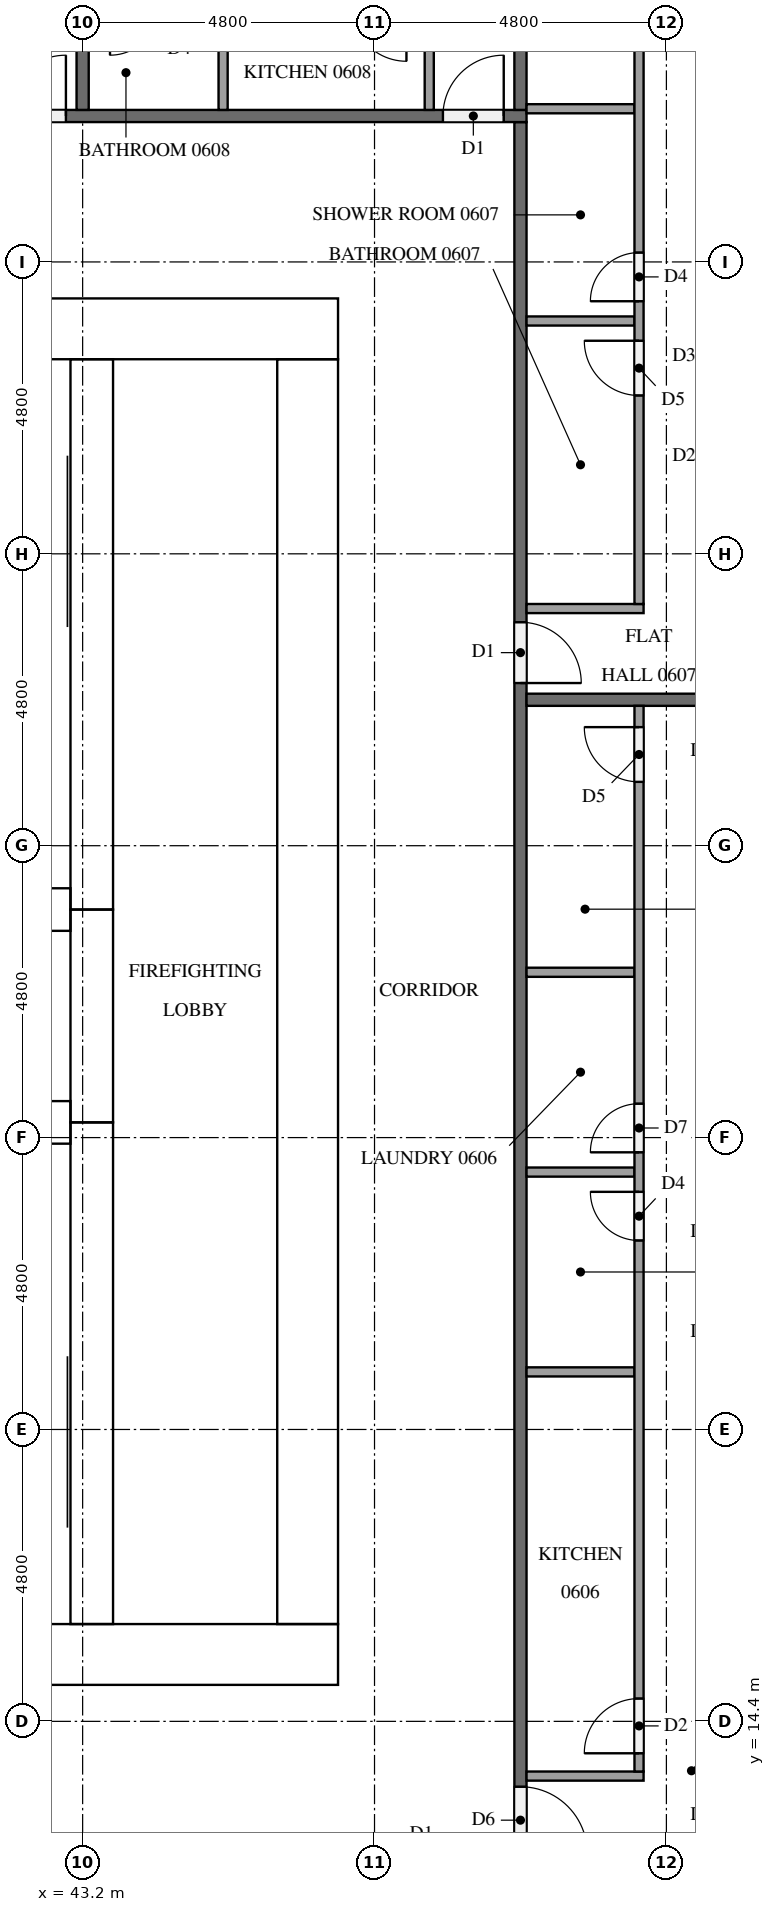
"""IFC4 building model, lengths in metres.
Left out: names, types, materials, properties, quantities, classifications, styles, units other than length and angle.
Written with IfcOpenShell. Run it as: python <this file> out.ifc"""

import sys

from ifc_helpers import new_model, si_unit, direction, frame, frame_2d, origin, place, context, subcontext, project, spatial, rectangle, extrude, element, fill, save


model = new_model("IFC4")
c1 = context("Model", 3, precision=1e-05, world=origin(), true_north=direction((0.0, 1.0)))
c2 = subcontext(c1, "Body", "Model", "MODEL_VIEW")
j1 = project(units=[si_unit("LENGTHUNIT", "METRE"), si_unit("PLANEANGLEUNIT", "RADIAN")], contexts=[c1])
p1 = place(None, origin())
s1 = spatial("IfcSite", under=j1, at=p1, CompositionType="ELEMENT")
p2 = place(p1, origin())
s2 = spatial("IfcBuilding", under=s1, at=p2, CompositionType="ELEMENT")
p3 = place(p2, frame((0.0, 0.0, 29.4)))
s3 = spatial("IfcBuildingStorey", under=s2, at=p3, CompositionType="ELEMENT", Elevation=29.4)
p4 = place(p3, frame((15.0, 15.5, 0.0), z_axis=(0.0, 0.0, 1.0), x_axis=(1.0, 0.0, 0.0)))
e1 = element("IfcWall", 1, at=p4, inside=s3, PredefinedType="SHEAR", context=c2, shape_type="SweptSolid", body=[
    extrude(rectangle(XDim=32.4, YDim=1.0, at=frame_2d((16.2, 0.0))), origin(), (0.0, 0.0, 1.0), 3.2),
])
p5 = place(p4, frame((15.3, 0.0, 0.0)))
e2 = element("IfcOpeningElement", 2, at=p5, cuts=e1, PredefinedType="OPENING", context=c2, shape_type="SweptSolid", body=[
    extrude(rectangle(XDim=1.8, YDim=2.1, at=frame_2d((0.9, 1.05))), frame((0.0, 0.51, 0.0), z_axis=(0.0, -1.0, 0.0), x_axis=(1.0, 0.0, 0.0)), (0.0, 0.0, 1.0), 1.02),
])
p6 = place(p3, frame((15.0, 37.3, 0.0), z_axis=(0.0, 0.0, 1.0), x_axis=(1.0, 0.0, 0.0)))
e3 = element("IfcWall", 3, at=p6, inside=s3, PredefinedType="SHEAR", context=c2, shape_type="SweptSolid", body=[
    extrude(rectangle(XDim=32.4, YDim=1.0, at=frame_2d((16.2, 0.0))), origin(), (0.0, 0.0, 1.0), 3.2),
])
p7 = place(p6, frame((15.3, 0.0, 0.0)))
e4 = element("IfcOpeningElement", 4, at=p7, cuts=e3, PredefinedType="OPENING", context=c2, shape_type="SweptSolid", body=[
    extrude(rectangle(XDim=1.8, YDim=2.1, at=frame_2d((0.9, 1.05))), frame((0.0, 0.51, 0.0), z_axis=(0.0, -1.0, 0.0), x_axis=(1.0, 0.0, 0.0)), (0.0, 0.0, 1.0), 1.02),
])
p8 = place(p6, frame((1.766, 0.0, 0.0)))
e5 = element("IfcOpeningElement", 5, at=p8, cuts=e3, PredefinedType="OPENING", context=c2, shape_type="SweptSolid", body=[
    extrude(rectangle(XDim=1.0, YDim=2.1, at=frame_2d((0.5, 1.05))), frame((0.0, 0.51, 0.0), z_axis=(0.0, -1.0, 0.0), x_axis=(1.0, 0.0, 0.0)), (0.0, 0.0, 1.0), 1.02),
])
p9 = place(p6, frame((5.241, 0.0, 0.0)))
e6 = element("IfcOpeningElement", 6, at=p9, cuts=e3, PredefinedType="OPENING", context=c2, shape_type="SweptSolid", body=[
    extrude(rectangle(XDim=1.0, YDim=2.1, at=frame_2d((0.5, 1.05))), frame((0.0, 0.51, 0.0), z_axis=(0.0, -1.0, 0.0), x_axis=(1.0, 0.0, 0.0)), (0.0, 0.0, 1.0), 1.02),
])
p10 = place(p3, frame((46.9, 16.0, 0.0), z_axis=(0.0, 0.0, 1.0), x_axis=(0.0, 1.0, 0.0)))
e7 = element("IfcWall", 7, at=p10, inside=s3, PredefinedType="SHEAR", context=c2, shape_type="SweptSolid", body=[
    extrude(rectangle(XDim=20.8, YDim=1.0, at=frame_2d((10.4, 0.0))), origin(), (0.0, 0.0, 1.0), 3.2),
])
p11 = place(p10, frame((10.1, 0.0, 0.0)))
e8 = element("IfcOpeningElement", 8, at=p11, cuts=e7, PredefinedType="OPENING", context=c2, shape_type="SweptSolid", body=[
    extrude(rectangle(XDim=1.2, YDim=2.1, at=frame_2d((0.6, 1.05))), frame((0.0, 0.51, 0.0), z_axis=(0.0, -1.0, 0.0), x_axis=(1.0, 0.0, 0.0)), (0.0, 0.0, 1.0), 1.02),
])
p12 = place(p3, frame((43.35, 16.0, 0.0), z_axis=(0.0, 0.0, 1.0), x_axis=(0.0, 1.0, 0.0)))
e9 = element("IfcWall", 9, at=p12, inside=s3, PredefinedType="SHEAR", context=c2, shape_type="SweptSolid", body=[
    extrude(rectangle(XDim=8.25, YDim=0.7, at=frame_2d((4.125, 0.0))), origin(), (0.0, 0.0, 1.0), 3.2),
])
p13 = place(p12, frame((0.2, 0.0, 0.0)))
e10 = element("IfcOpeningElement", 10, at=p13, cuts=e9, PredefinedType="OPENING", context=c2, shape_type="SweptSolid", body=[
    extrude(rectangle(XDim=1.2, YDim=2.1, at=frame_2d((0.6, 1.05))), frame((0.0, 0.36, 0.0), z_axis=(0.0, -1.0, 0.0), x_axis=(1.0, 0.0, 0.0)), (0.0, 0.0, 1.0), 0.72),
])
p14 = place(p3, frame((43.35, 24.25, 0.0), z_axis=(0.0, 0.0, 1.0), x_axis=(0.0, 1.0, 0.0)))
e11 = element("IfcWall", 11, at=p14, inside=s3, PredefinedType="SHEAR", context=c2, shape_type="SweptSolid", body=[
    extrude(rectangle(XDim=3.5, YDim=0.7, at=frame_2d((1.75, 0.0))), origin(), (0.0, 0.0, 1.0), 3.2),
])
p15 = place(p14, frame((1.2, 0.0, 0.0)))
e12 = element("IfcOpeningElement", 12, at=p15, cuts=e11, PredefinedType="OPENING", context=c2, shape_type="SweptSolid", body=[
    extrude(rectangle(XDim=1.1, YDim=2.1, at=frame_2d((0.55, 1.05))), frame((0.0, 0.36, 0.0), z_axis=(0.0, -1.0, 0.0), x_axis=(1.0, 0.0, 0.0)), (0.0, 0.0, 1.0), 0.72),
])
p16 = place(p3, frame((43.35, 27.75, 0.0), z_axis=(0.0, 0.0, 1.0), x_axis=(0.0, 1.0, 0.0)))
e13 = element("IfcWall", 13, at=p16, inside=s3, PredefinedType="SHEAR", context=c2, shape_type="SweptSolid", body=[
    extrude(rectangle(XDim=9.05, YDim=0.7, at=frame_2d((4.525, 0.0))), origin(), (0.0, 0.0, 1.0), 3.2),
])
p17 = place(p16, frame((7.65, 0.0, 0.0)))
e14 = element("IfcOpeningElement", 14, at=p17, cuts=e13, PredefinedType="OPENING", context=c2, shape_type="SweptSolid", body=[
    extrude(rectangle(XDim=1.2, YDim=2.1, at=frame_2d((0.6, 1.05))), frame((0.0, 0.36, 0.0), z_axis=(0.0, -1.0, 0.0), x_axis=(1.0, 0.0, 0.0)), (0.0, 0.0, 1.0), 0.72),
])
for number, where, z_axis, x_axis in (
    (15, (39.65, 24.25, 0.0), (0.0, 0.0, 1.0), (1.0, 0.0, 0.0)),
    (16, (39.65, 27.75, 0.0), (0.0, 0.0, 1.0), (1.0, 0.0, 0.0)),
):
    element("IfcWall", number, at=place(p3, frame(where, z_axis=z_axis, x_axis=x_axis)), inside=s3, PredefinedType="SHEAR", context=c2, shape_type="SweptSolid", body=[
        extrude(rectangle(XDim=3.35, YDim=0.7, at=frame_2d((1.675, 0.0))), origin(), (0.0, 0.0, 1.0), 3.2),
    ])
p18 = place(p3, frame((50.4, 40.7, 0.0), z_axis=(0.0, 0.0, 1.0), x_axis=(0.0, -1.0, 0.0)))
e17 = element("IfcWall", 17, at=p18, inside=s3, PredefinedType="PARTITIONING", context=c2, shape_type="SweptSolid", body=[
    extrude(rectangle(XDim=28.6, YDim=0.2, at=frame_2d((14.3, 0.0))), origin(), (0.0, 0.0, 1.0), 3.2),
])
p19 = place(p18, frame((27.375, 0.0, 0.0)))
e18 = element("IfcOpeningElement", 18, at=p19, cuts=e17, PredefinedType="OPENING", context=c2, shape_type="SweptSolid", body=[
    extrude(rectangle(XDim=1.1, YDim=2.1, at=frame_2d((0.55, 1.05))), frame((0.0, 0.11, 0.0), z_axis=(0.0, -1.0, 0.0), x_axis=(1.0, 0.0, 0.0)), (0.0, 0.0, 1.0), 0.22),
])
p20 = place(p18, frame((8.225, 0.0, 0.0)))
e19 = element("IfcOpeningElement", 19, at=p20, cuts=e17, PredefinedType="OPENING", context=c2, shape_type="SweptSolid", body=[
    extrude(rectangle(XDim=1.0, YDim=2.1, at=frame_2d((0.5, 1.05))), frame((0.0, 0.11, 0.0), z_axis=(0.0, -1.0, 0.0), x_axis=(1.0, 0.0, 0.0)), (0.0, 0.0, 1.0), 0.22),
])
p21 = place(p3, frame((11.9, 40.8, 0.0), z_axis=(0.0, 0.0, 1.0), x_axis=(1.0, 0.0, 0.0)))
e20 = element("IfcWall", 20, at=p21, inside=s3, PredefinedType="PARTITIONING", context=c2, shape_type="SweptSolid", body=[
    extrude(rectangle(XDim=38.6, YDim=0.2, at=frame_2d((19.3, 0.0))), origin(), (0.0, 0.0, 1.0), 3.2),
])
p22 = place(p21, frame((37.225, 0.0, 0.0)))
e21 = element("IfcOpeningElement", 21, at=p22, cuts=e20, PredefinedType="OPENING", context=c2, shape_type="SweptSolid", body=[
    extrude(rectangle(XDim=1.0, YDim=2.1, at=frame_2d((0.5, 1.05))), frame((0.0, 0.11, 0.0), z_axis=(0.0, -1.0, 0.0), x_axis=(1.0, 0.0, 0.0)), (0.0, 0.0, 1.0), 0.22),
])
p23 = place(p21, frame((30.025, 0.0, 0.0)))
e22 = element("IfcOpeningElement", 22, at=p23, cuts=e20, PredefinedType="OPENING", context=c2, shape_type="SweptSolid", body=[
    extrude(rectangle(XDim=1.0, YDim=2.1, at=frame_2d((0.5, 1.05))), frame((0.0, 0.11, 0.0), z_axis=(0.0, -1.0, 0.0), x_axis=(1.0, 0.0, 0.0)), (0.0, 0.0, 1.0), 0.22),
])
p24 = place(p21, frame((2.725, 0.0, 0.0)))
e23 = element("IfcOpeningElement", 23, at=p24, cuts=e20, PredefinedType="OPENING", context=c2, shape_type="SweptSolid", body=[
    extrude(rectangle(XDim=1.1, YDim=2.1, at=frame_2d((0.55, 1.05))), frame((0.0, 0.11, 0.0), z_axis=(0.0, -1.0, 0.0), x_axis=(1.0, 0.0, 0.0)), (0.0, 0.0, 1.0), 0.22),
])
p25 = place(p21, frame((1.225, 0.0, 0.0)))
e24 = element("IfcOpeningElement", 24, at=p25, cuts=e20, PredefinedType="OPENING", context=c2, shape_type="SweptSolid", body=[
    extrude(rectangle(XDim=1.0, YDim=2.1, at=frame_2d((0.5, 1.05))), frame((0.0, 0.11, 0.0), z_axis=(0.0, -1.0, 0.0), x_axis=(1.0, 0.0, 0.0)), (0.0, 0.0, 1.0), 0.22),
])
for number, where, z_axis, x_axis in (
    (25, (50.5, 31.2, 0.0), (0.0, 0.0, 1.0), (1.0, 0.0, 0.0)),
    (26, (50.4, 40.9, 0.0), (0.0, 0.0, 1.0), (0.0, 1.0, 0.0)),
):
    element("IfcWall", number, at=place(p3, frame(where, z_axis=z_axis, x_axis=x_axis)), inside=s3, PredefinedType="PARTITIONING", context=c2, shape_type="SweptSolid", body=[
        extrude(rectangle(XDim=7.0, YDim=0.2, at=frame_2d((3.5, 0.0))), origin(), (0.0, 0.0, 1.0), 3.2),
    ])
p26 = place(p3, frame((43.2, 47.55, 0.0), z_axis=(0.0, 0.0, 1.0), x_axis=(0.0, -1.0, 0.0)))
e27 = element("IfcWall", 27, at=p26, inside=s3, PredefinedType="PARTITIONING", context=c2, shape_type="SweptSolid", body=[
    extrude(rectangle(XDim=6.65, YDim=0.2, at=frame_2d((3.325, 0.0))), origin(), (0.0, 0.0, 1.0), 3.2),
])
for number, where, z_axis, x_axis in (
    (28, (50.5, 20.147, 0.0), (0.0, 0.0, 1.0), (1.0, 0.0, 0.0)),
    (29, (50.5, 23.433, 0.0), (0.0, 0.0, 1.0), (1.0, 0.0, 0.0)),
    (30, (50.5, 26.719, 0.0), (0.0, 0.0, 1.0), (1.0, 0.0, 0.0)),
):
    element("IfcWall", number, at=place(p3, frame(where, z_axis=z_axis, x_axis=x_axis)), inside=s3, PredefinedType="PARTITIONING", context=c2, shape_type="SweptSolid", body=[
        extrude(rectangle(XDim=1.775, YDim=0.15, at=frame_2d((0.887, 0.0))), origin(), (0.0, 0.0, 1.0), 3.2),
    ])
p27 = place(p3, frame((50.5, 13.5, 0.0), z_axis=(0.0, 0.0, 1.0), x_axis=(1.0, 0.0, 0.0)))
e31 = element("IfcWall", 31, at=p27, inside=s3, PredefinedType="PARTITIONING", context=c2, shape_type="SweptSolid", body=[
    extrude(rectangle(XDim=1.925, YDim=0.15, at=frame_2d((0.962, 0.0))), origin(), (0.0, 0.0, 1.0), 3.2),
])
p28 = place(p3, frame((52.35, 13.575, 0.0), z_axis=(0.0, 0.0, 1.0), x_axis=(0.0, 1.0, 0.0)))
e32 = element("IfcWall", 32, at=p28, inside=s3, PredefinedType="PARTITIONING", context=c2, shape_type="SweptSolid", body=[
    extrude(rectangle(XDim=17.525, YDim=0.15, at=frame_2d((8.763, 0.0))), origin(), (0.0, 0.0, 1.0), 3.2),
])
p29 = place(p28, frame((0.3, 0.0, 0.0)))
e33 = element("IfcOpeningElement", 33, at=p29, cuts=e32, PredefinedType="OPENING", context=c2, shape_type="SweptSolid", body=[
    extrude(rectangle(XDim=0.9, YDim=2.1, at=frame_2d((0.45, 1.05))), frame((0.0, 0.085, 0.0), z_axis=(0.0, -1.0, 0.0), x_axis=(1.0, 0.0, 0.0)), (0.0, 0.0, 1.0), 0.17),
])
p30 = place(p28, frame((8.733, 0.0, 0.0)))
e34 = element("IfcOpeningElement", 34, at=p30, cuts=e32, PredefinedType="OPENING", context=c2, shape_type="SweptSolid", body=[
    extrude(rectangle(XDim=0.8, YDim=2.1, at=frame_2d((0.4, 1.05))), frame((0.0, 0.085, 0.0), z_axis=(0.0, -1.0, 0.0), x_axis=(1.0, 0.0, 0.0)), (0.0, 0.0, 1.0), 0.17),
])
p31 = place(p28, frame((10.183, 0.0, 0.0)))
e35 = element("IfcOpeningElement", 35, at=p31, cuts=e32, PredefinedType="OPENING", context=c2, shape_type="SweptSolid", body=[
    extrude(rectangle(XDim=0.8, YDim=2.1, at=frame_2d((0.4, 1.05))), frame((0.0, 0.085, 0.0), z_axis=(0.0, -1.0, 0.0), x_axis=(1.0, 0.0, 0.0)), (0.0, 0.0, 1.0), 0.17),
])
p32 = place(p28, frame((16.275, 0.0, 0.0)))
e36 = element("IfcOpeningElement", 36, at=p32, cuts=e32, PredefinedType="OPENING", context=c2, shape_type="SweptSolid", body=[
    extrude(rectangle(XDim=0.9, YDim=2.1, at=frame_2d((0.45, 1.05))), frame((0.0, 0.085, 0.0), z_axis=(0.0, -1.0, 0.0), x_axis=(1.0, 0.0, 0.0)), (0.0, 0.0, 1.0), 0.17),
])
for number, where, z_axis, x_axis in (
    (37, (50.5, 37.429, 0.0), (0.0, 0.0, 1.0), (1.0, 0.0, 0.0)),
    (38, (50.5, 40.919, 0.0), (0.0, 0.0, 1.0), (1.0, 0.0, 0.0)),
):
    element("IfcWall", number, at=place(p3, frame(where, z_axis=z_axis, x_axis=x_axis)), inside=s3, PredefinedType="PARTITIONING", context=c2, shape_type="SweptSolid", body=[
        extrude(rectangle(XDim=1.775, YDim=0.15, at=frame_2d((0.887, 0.0))), origin(), (0.0, 0.0, 1.0), 3.2),
    ])
p33 = place(p3, frame((50.5, 32.7, 0.0), z_axis=(0.0, 0.0, 1.0), x_axis=(1.0, 0.0, 0.0)))
e39 = element("IfcWall", 39, at=p33, inside=s3, PredefinedType="PARTITIONING", context=c2, shape_type="SweptSolid", body=[
    extrude(rectangle(XDim=1.925, YDim=0.15, at=frame_2d((0.962, 0.0))), origin(), (0.0, 0.0, 1.0), 3.2),
])
p34 = place(p3, frame((52.35, 32.775, 0.0), z_axis=(0.0, 0.0, 1.0), x_axis=(0.0, 1.0, 0.0)))
e40 = element("IfcWall", 40, at=p34, inside=s3, PredefinedType="PARTITIONING", context=c2, shape_type="SweptSolid", body=[
    extrude(rectangle(XDim=14.6, YDim=0.15, at=frame_2d((7.3, 0.0))), origin(), (0.0, 0.0, 1.0), 3.2),
])
p35 = place(p34, frame((3.429, 0.0, 0.0)))
e41 = element("IfcOpeningElement", 41, at=p35, cuts=e40, PredefinedType="OPENING", context=c2, shape_type="SweptSolid", body=[
    extrude(rectangle(XDim=0.9, YDim=2.1, at=frame_2d((0.45, 1.05))), frame((0.0, 0.085, 0.0), z_axis=(0.0, -1.0, 0.0), x_axis=(1.0, 0.0, 0.0)), (0.0, 0.0, 1.0), 0.17),
])
p36 = place(p34, frame((4.979, 0.0, 0.0)))
e42 = element("IfcOpeningElement", 42, at=p36, cuts=e40, PredefinedType="OPENING", context=c2, shape_type="SweptSolid", body=[
    extrude(rectangle(XDim=0.8, YDim=2.1, at=frame_2d((0.4, 1.05))), frame((0.0, 0.085, 0.0), z_axis=(0.0, -1.0, 0.0), x_axis=(1.0, 0.0, 0.0)), (0.0, 0.0, 1.0), 0.17),
])
p37 = place(p34, frame((13.4, 0.0, 0.0)))
e43 = element("IfcOpeningElement", 43, at=p37, cuts=e40, PredefinedType="OPENING", context=c2, shape_type="SweptSolid", body=[
    extrude(rectangle(XDim=0.9, YDim=2.1, at=frame_2d((0.45, 1.05))), frame((0.0, 0.085, 0.0), z_axis=(0.0, -1.0, 0.0), x_axis=(1.0, 0.0, 0.0)), (0.0, 0.0, 1.0), 0.17),
])
p38 = place(p3, frame((45.51, 40.9, 0.0), z_axis=(0.0, 0.0, 1.0), x_axis=(0.0, 1.0, 0.0)))
e44 = element("IfcWall", 44, at=p38, inside=s3, PredefinedType="PARTITIONING", context=c2, shape_type="SweptSolid", body=[
    extrude(rectangle(XDim=1.625, YDim=0.15, at=frame_2d((0.812, 0.0))), origin(), (0.0, 0.0, 1.0), 3.2),
])
p39 = place(p3, frame((48.9, 40.9, 0.0), z_axis=(0.0, 0.0, 1.0), x_axis=(0.0, 1.0, 0.0)))
e45 = element("IfcWall", 45, at=p39, inside=s3, PredefinedType="PARTITIONING", context=c2, shape_type="SweptSolid", body=[
    extrude(rectangle(XDim=1.775, YDim=0.15, at=frame_2d((0.888, 0.0))), origin(), (0.0, 0.0, 1.0), 3.2),
])
p40 = place(p15, origin())
e46 = element("IfcDoor", 46, at=p40, inside=s3, OperationType="DOUBLE_DOOR_SLIDING", PredefinedType="DOOR", context=c2, shape_type="SweptSolid", body=[
    extrude(rectangle(XDim=1.1, YDim=2.1, at=frame_2d((0.55, 1.05))), frame((0.0, 0.025, 0.0), z_axis=(0.0, -1.0, 0.0), x_axis=(1.0, 0.0, 0.0)), (0.0, 0.0, 1.0), 0.05),
])
fill(e12, e46)
p41 = place(p13, origin())
e47 = element("IfcDoor", 47, at=p41, inside=s3, OperationType="SINGLE_SWING_LEFT", PredefinedType="DOOR", context=c2, shape_type="SweptSolid", body=[
    extrude(rectangle(XDim=1.2, YDim=2.1, at=frame_2d((0.6, 1.05))), frame((0.0, 0.025, 0.0), z_axis=(0.0, -1.0, 0.0), x_axis=(1.0, 0.0, 0.0)), (0.0, 0.0, 1.0), 0.05),
])
fill(e10, e47)
p42 = place(p17, origin())
e48 = element("IfcDoor", 48, at=p42, inside=s3, OperationType="SINGLE_SWING_RIGHT", PredefinedType="DOOR", context=c2, shape_type="SweptSolid", body=[
    extrude(rectangle(XDim=1.2, YDim=2.1, at=frame_2d((0.6, 1.05))), frame((0.0, 0.025, 0.0), z_axis=(0.0, -1.0, 0.0), x_axis=(1.0, 0.0, 0.0)), (0.0, 0.0, 1.0), 0.05),
])
fill(e14, e48)
p43 = place(p11, origin())
e49 = element("IfcDoor", 49, at=p43, inside=s3, OperationType="SINGLE_SWING_RIGHT", PredefinedType="DOOR", context=c2, shape_type="SweptSolid", body=[
    extrude(rectangle(XDim=1.2, YDim=2.1, at=frame_2d((0.6, 1.05))), frame((0.0, 0.025, 0.0), z_axis=(0.0, -1.0, 0.0), x_axis=(1.0, 0.0, 0.0)), (0.0, 0.0, 1.0), 0.05),
])
fill(e8, e49)
p44 = place(p19, origin())
e50 = element("IfcDoor", 50, at=p44, inside=s3, OperationType="SINGLE_SWING_RIGHT", PredefinedType="DOOR", context=c2, shape_type="SweptSolid", body=[
    extrude(rectangle(XDim=1.1, YDim=2.1, at=frame_2d((0.55, 1.05))), frame((0.0, 0.025, 0.0), z_axis=(0.0, -1.0, 0.0), x_axis=(1.0, 0.0, 0.0)), (0.0, 0.0, 1.0), 0.05),
])
fill(e18, e50)
p45 = place(p20, origin())
e51 = element("IfcDoor", 51, at=p45, inside=s3, OperationType="SINGLE_SWING_RIGHT", PredefinedType="DOOR", context=c2, shape_type="SweptSolid", body=[
    extrude(rectangle(XDim=1.0, YDim=2.1, at=frame_2d((0.5, 1.05))), frame((0.0, 0.025, 0.0), z_axis=(0.0, -1.0, 0.0), x_axis=(1.0, 0.0, 0.0)), (0.0, 0.0, 1.0), 0.05),
])
fill(e19, e51)
p46 = place(p22, origin())
e52 = element("IfcDoor", 52, at=p46, inside=s3, OperationType="SINGLE_SWING_RIGHT", PredefinedType="DOOR", context=c2, shape_type="SweptSolid", body=[
    extrude(rectangle(XDim=1.0, YDim=2.1, at=frame_2d((0.5, 1.05))), frame((0.0, 0.025, 0.0), z_axis=(0.0, -1.0, 0.0), x_axis=(1.0, 0.0, 0.0)), (0.0, 0.0, 1.0), 0.05),
])
fill(e21, e52)
p47 = place(p23, origin())
e53 = element("IfcDoor", 53, at=p47, inside=s3, OperationType="SINGLE_SWING_RIGHT", PredefinedType="DOOR", context=c2, shape_type="SweptSolid", body=[
    extrude(rectangle(XDim=1.0, YDim=2.1, at=frame_2d((0.5, 1.05))), frame((0.0, 0.025, 0.0), z_axis=(0.0, -1.0, 0.0), x_axis=(1.0, 0.0, 0.0)), (0.0, 0.0, 1.0), 0.05),
])
fill(e22, e53)
p48 = place(p29, origin())
e54 = element("IfcDoor", 54, at=p48, inside=s3, OperationType="SINGLE_SWING_LEFT", PredefinedType="DOOR", context=c2, shape_type="SweptSolid", body=[
    extrude(rectangle(XDim=0.9, YDim=2.1, at=frame_2d((0.45, 1.05))), frame((0.0, 0.025, 0.0), z_axis=(0.0, -1.0, 0.0), x_axis=(1.0, 0.0, 0.0)), (0.0, 0.0, 1.0), 0.05),
])
fill(e33, e54)
p49 = place(p30, origin())
e55 = element("IfcDoor", 55, at=p49, inside=s3, OperationType="SINGLE_SWING_RIGHT", PredefinedType="DOOR", context=c2, shape_type="SweptSolid", body=[
    extrude(rectangle(XDim=0.8, YDim=2.1, at=frame_2d((0.4, 1.05))), frame((0.0, 0.025, 0.0), z_axis=(0.0, -1.0, 0.0), x_axis=(1.0, 0.0, 0.0)), (0.0, 0.0, 1.0), 0.05),
])
fill(e34, e55)
p50 = place(p31, origin())
e56 = element("IfcDoor", 56, at=p50, inside=s3, OperationType="SINGLE_SWING_LEFT", PredefinedType="DOOR", context=c2, shape_type="SweptSolid", body=[
    extrude(rectangle(XDim=0.8, YDim=2.1, at=frame_2d((0.4, 1.05))), frame((0.0, 0.025, 0.0), z_axis=(0.0, -1.0, 0.0), x_axis=(1.0, 0.0, 0.0)), (0.0, 0.0, 1.0), 0.05),
])
fill(e35, e56)
p51 = place(p32, origin())
e57 = element("IfcDoor", 57, at=p51, inside=s3, OperationType="SINGLE_SWING_RIGHT", PredefinedType="DOOR", context=c2, shape_type="SweptSolid", body=[
    extrude(rectangle(XDim=0.9, YDim=2.1, at=frame_2d((0.45, 1.05))), frame((0.0, 0.025, 0.0), z_axis=(0.0, -1.0, 0.0), x_axis=(1.0, 0.0, 0.0)), (0.0, 0.0, 1.0), 0.05),
])
fill(e36, e57)
p52 = place(p35, origin())
e58 = element("IfcDoor", 58, at=p52, inside=s3, OperationType="SINGLE_SWING_RIGHT", PredefinedType="DOOR", context=c2, shape_type="SweptSolid", body=[
    extrude(rectangle(XDim=0.9, YDim=2.1, at=frame_2d((0.45, 1.05))), frame((0.0, 0.025, 0.0), z_axis=(0.0, -1.0, 0.0), x_axis=(1.0, 0.0, 0.0)), (0.0, 0.0, 1.0), 0.05),
])
fill(e41, e58)
p53 = place(p36, origin())
e59 = element("IfcDoor", 59, at=p53, inside=s3, OperationType="SINGLE_SWING_LEFT", PredefinedType="DOOR", context=c2, shape_type="SweptSolid", body=[
    extrude(rectangle(XDim=0.8, YDim=2.1, at=frame_2d((0.4, 1.05))), frame((0.0, 0.025, 0.0), z_axis=(0.0, -1.0, 0.0), x_axis=(1.0, 0.0, 0.0)), (0.0, 0.0, 1.0), 0.05),
])
fill(e42, e59)
save(model, sys.argv[1])
